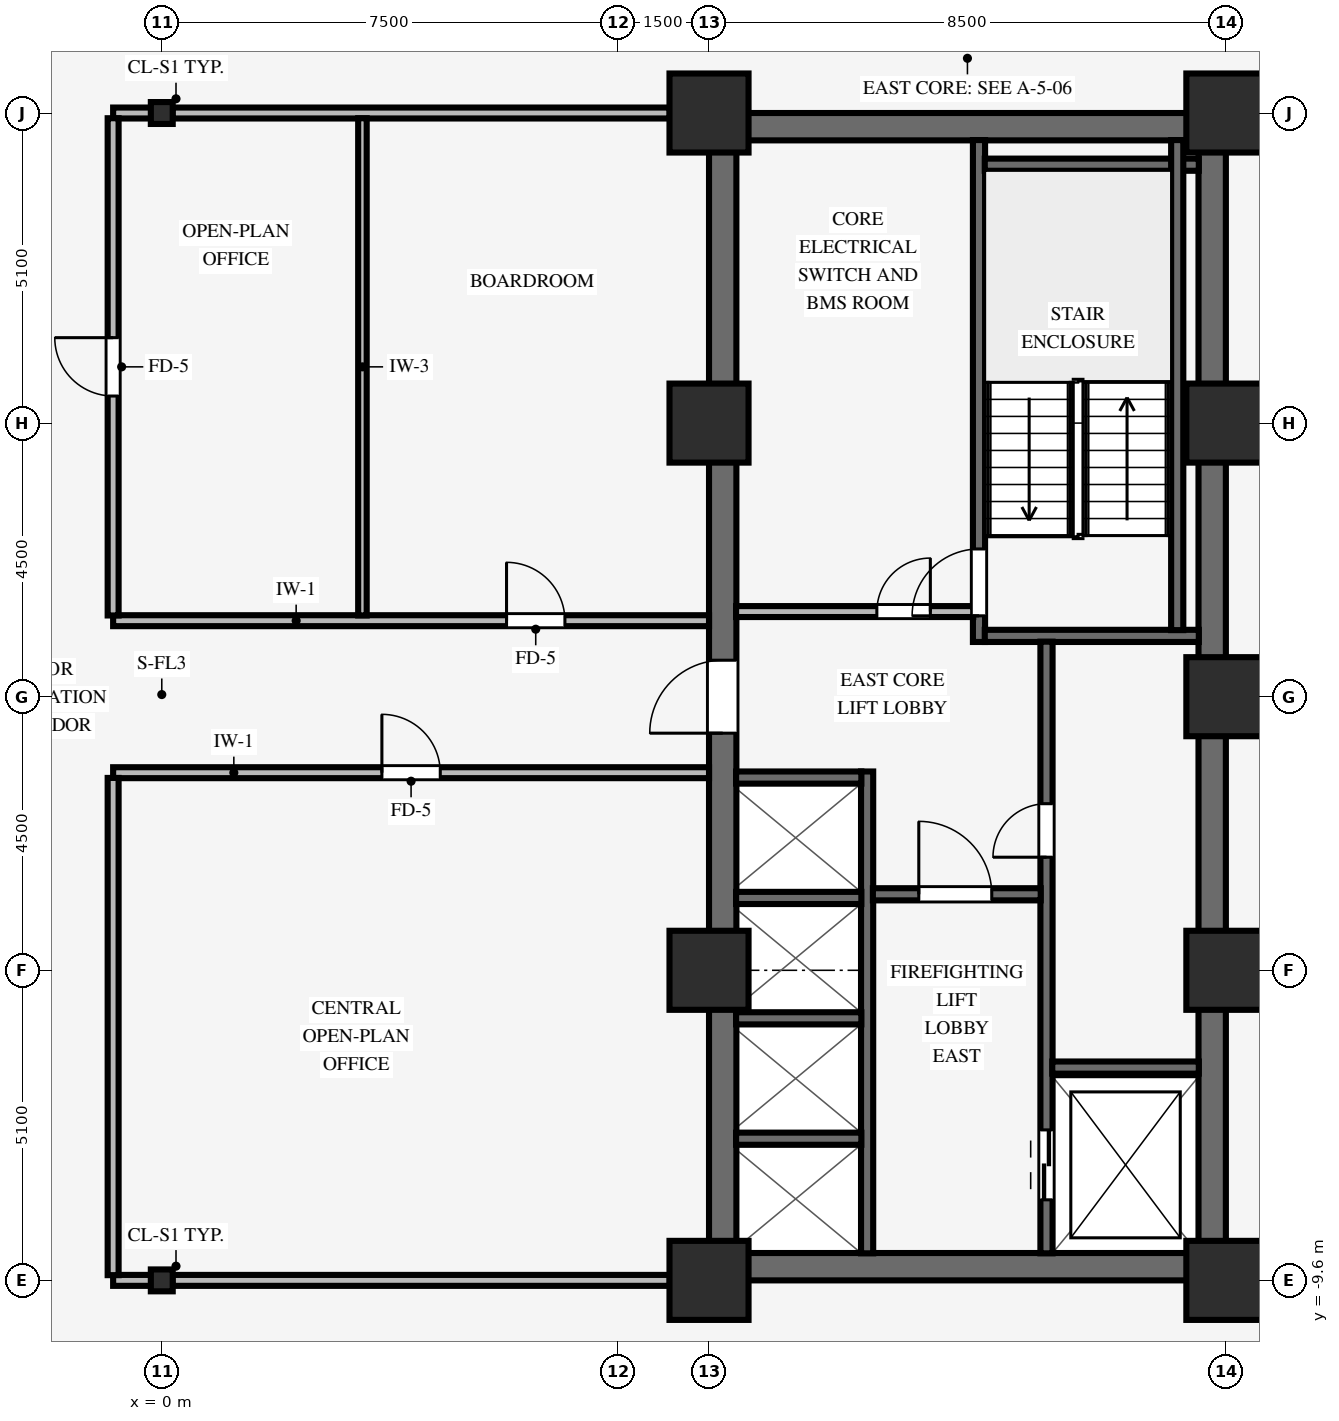
"""IFC4 building model, lengths in metres.
Left out: names, types, materials, properties, quantities, classifications, styles, units other than length and angle.
Written with IfcOpenShell. Run it as: python <this file> out.ifc"""

import sys

from ifc_helpers import new_model, si_unit, direction, frame, frame_2d, origin, origin_2d, place, context, subcontext, project, spatial, rectangle, i_section, extrude, source, transform, mapped, element, fill, save


model = new_model("IFC4")
c1 = context("Model", 3, precision=1e-05, world=origin(), true_north=direction((0.0, 1.0)))
c2 = subcontext(c1, "Body", "Model", "MODEL_VIEW")
j1 = project(units=[si_unit("LENGTHUNIT", "METRE"), si_unit("PLANEANGLEUNIT", "RADIAN")], contexts=[c1])
p1 = place(None, origin())
s1 = spatial("IfcSite", under=j1, at=p1, CompositionType="ELEMENT")
p2 = place(p1, origin())
s2 = spatial("IfcBuilding", under=s1, at=p2, CompositionType="ELEMENT")
p3 = place(p2, frame((0.0, 0.0, 27.6)))
s3 = spatial("IfcBuildingStorey", under=s2, at=p3, CompositionType="ELEMENT", Elevation=27.6)
for number, where, z_axis, x_axis in (
    (1, (9.0, -9.375, 0.0), (0.0, 0.0, 1.0), (1.0, 0.0, 0.0)),
    (2, (9.0, 9.375, 0.0), (0.0, 0.0, 1.0), (1.0, 0.0, 0.0)),
):
    element("IfcWall", number, at=place(p3, frame(where, z_axis=z_axis, x_axis=x_axis)), inside=s3, PredefinedType="SHEAR", context=c2, shape_type="SweptSolid", body=[
        extrude(rectangle(XDim=8.5, YDim=0.45, at=frame_2d((4.25, 0.0))), origin(), (0.0, 0.0, 1.0), 3.37),
    ])
p4 = place(p3, frame((9.225, -9.155, 0.0), z_axis=(0.0, 0.0, 1.0), x_axis=(0.0, 1.0, 0.0)))
e3 = element("IfcWall", 3, at=p4, inside=s3, PredefinedType="SHEAR", context=c2, shape_type="SweptSolid", body=[
    extrude(rectangle(XDim=18.31, YDim=0.45, at=frame_2d((9.155, 0.0))), origin(), (0.0, 0.0, 1.0), 3.37),
])
p5 = place(p4, frame((8.555, 0.0, 0.0)))
e4 = element("IfcOpeningElement", 4, at=p5, cuts=e3, PredefinedType="OPENING", context=c2, shape_type="SweptSolid", body=[
    extrude(rectangle(XDim=1.2, YDim=2.15, at=frame_2d((0.6, 1.075))), frame((0.0, 0.235, 0.0), z_axis=(0.0, -1.0, 0.0), x_axis=(1.0, 0.0, 0.0)), (0.0, 0.0, 1.0), 0.47),
])
p6 = place(p3, frame((17.275, -9.155, 0.0), z_axis=(0.0, 0.0, 1.0), x_axis=(0.0, 1.0, 0.0)))
e5 = element("IfcWall", 5, at=p6, inside=s3, PredefinedType="SHEAR", context=c2, shape_type="SweptSolid", body=[
    extrude(rectangle(XDim=18.31, YDim=0.45, at=frame_2d((9.155, 0.0))), origin(), (0.0, 0.0, 1.0), 3.37),
])
for number, where, z_axis, x_axis in (
    (6, (9.0, -9.6, 0.0), (0.0, 0.0, 1.0), (1.0, 0.0, 0.0)),
    (7, (9.0, -4.5, 0.0), (0.0, 0.0, 1.0), (1.0, 0.0, 0.0)),
    (8, (9.0, 4.5, 0.0), (0.0, 0.0, 1.0), (1.0, 0.0, 0.0)),
    (9, (9.0, 9.6, 0.0), (0.0, 0.0, 1.0), (1.0, 0.0, 0.0)),
    (10, (17.5, -9.6, 0.0), (0.0, 0.0, 1.0), (1.0, 0.0, 0.0)),
    (11, (17.5, -4.5, 0.0), (0.0, 0.0, 1.0), (1.0, 0.0, 0.0)),
    (12, (17.5, 4.5, 0.0), (0.0, 0.0, 1.0), (1.0, 0.0, 0.0)),
    (13, (17.5, 9.6, 0.0), (0.0, 0.0, 1.0), (1.0, 0.0, 0.0)),
    (14, (17.5, 0.0, 0.0), (0.0, 0.0, 1.0), (1.0, 0.0, 0.0)),
):
    element("IfcColumn", number, at=place(p3, frame(where, z_axis=z_axis, x_axis=x_axis)), inside=s3, PredefinedType="COLUMN", context=c2, shape_type="SweptSolid", body=[
        extrude(rectangle(XDim=1.3, YDim=1.3, at=origin_2d()), origin(), (0.0, 0.0, 1.0), 3.37),
    ])
for number, where, z_axis, x_axis in (
    (15, (0.0, -9.6, 0.0), (0.0, 0.0, 1.0), (1.0, 0.0, 0.0)),
    (16, (0.0, 9.6, 0.0), (0.0, 0.0, 1.0), (1.0, 0.0, 0.0)),
):
    element("IfcColumn", number, at=place(p3, frame(where, z_axis=z_axis, x_axis=x_axis)), inside=s3, PredefinedType="COLUMN", context=c2, shape_type="SweptSolid", body=[
        extrude(i_section(OverallWidth=0.36, OverallDepth=0.36, WebThickness=0.021, FlangeThickness=0.021, FilletRadius=0.018, at=origin_2d()), origin(), (0.0, 0.0, 1.0), 3.37),
    ])
p7 = place(p3, frame((13.44, 0.9, 0.0), z_axis=(0.0, 0.0, 1.0), x_axis=(0.0, 1.0, 0.0)))
e17 = element("IfcWall", 17, at=p7, inside=s3, PredefinedType="SHEAR", context=c2, shape_type="SweptSolid", body=[
    extrude(rectangle(XDim=8.255, YDim=0.2, at=frame_2d((4.127, 0.0))), origin(), (0.0, 0.0, 1.0), 3.37),
])
p8 = place(p7, frame((0.43, 0.0, 0.0)))
e18 = element("IfcOpeningElement", 18, at=p8, cuts=e17, PredefinedType="OPENING", context=c2, shape_type="SweptSolid", body=[
    extrude(rectangle(XDim=1.1, YDim=2.15, at=frame_2d((0.55, 1.075))), frame((0.0, 0.11, 0.0), z_axis=(0.0, -1.0, 0.0), x_axis=(1.0, 0.0, 0.0)), (0.0, 0.0, 1.0), 0.22),
])
for number, where, z_axis, x_axis in (
    (19, (13.535, 1.0, 0.0), (0.0, 0.0, 1.0), (1.0, 0.0, 0.0)),
    (20, (13.535, 8.75, 0.0), (0.0, 0.0, 1.0), (1.0, 0.0, 0.0)),
):
    element("IfcWall", number, at=place(p3, frame(where, z_axis=z_axis, x_axis=x_axis)), inside=s3, PredefinedType="SHEAR", context=c2, shape_type="SweptSolid", body=[
        extrude(rectangle(XDim=3.52, YDim=0.2, at=frame_2d((1.76, 0.0))), origin(), (0.0, 0.0, 1.0), 3.37),
    ])
p9 = place(p3, frame((16.7, 1.095, 0.0), z_axis=(0.0, 0.0, 1.0), x_axis=(0.0, 1.0, 0.0)))
e21 = element("IfcWall", 21, at=p9, inside=s3, PredefinedType="SHEAR", context=c2, shape_type="SweptSolid", body=[
    extrude(rectangle(XDim=8.06, YDim=0.2, at=frame_2d((4.03, 0.0))), origin(), (0.0, 0.0, 1.0), 3.37),
])
p10 = place(p3, frame((14.55, -9.155, 0.0), z_axis=(0.0, 0.0, 1.0), x_axis=(0.0, 1.0, 0.0)))
e22 = element("IfcWall", 22, at=p10, inside=s3, PredefinedType="SHEAR", context=c2, shape_type="SweptSolid", body=[
    extrude(rectangle(XDim=10.06, YDim=0.2, at=frame_2d((5.03, 0.0))), origin(), (0.0, 0.0, 1.0), 3.37),
])
p11 = place(p10, frame((6.515, 0.0, 0.0)))
e23 = element("IfcOpeningElement", 23, at=p11, cuts=e22, PredefinedType="OPENING", context=c2, shape_type="SweptSolid", body=[
    extrude(rectangle(XDim=0.88, YDim=2.1, at=frame_2d((0.44, 1.05))), frame((0.0, 0.11, 0.0), z_axis=(0.0, -1.0, 0.0), x_axis=(1.0, 0.0, 0.0)), (0.0, 0.0, 1.0), 0.22),
])
p12 = place(p10, frame((0.88, 0.0, 0.0)))
e24 = element("IfcOpeningElement", 24, at=p12, cuts=e22, PredefinedType="OPENING", context=c2, shape_type="SweptSolid", body=[
    extrude(rectangle(XDim=1.15, YDim=2.15, at=frame_2d((0.575, 1.075))), frame((0.0, 0.11, 0.0), z_axis=(0.0, -1.0, 0.0), x_axis=(1.0, 0.0, 0.0)), (0.0, 0.0, 1.0), 0.22),
])
p13 = place(p3, frame((14.645, -6.1, 0.0), z_axis=(0.0, 0.0, 1.0), x_axis=(1.0, 0.0, 0.0)))
e25 = element("IfcWall", 25, at=p13, inside=s3, PredefinedType="SHEAR", context=c2, shape_type="SweptSolid", body=[
    extrude(rectangle(XDim=2.41, YDim=0.2, at=frame_2d((1.205, 0.0))), origin(), (0.0, 0.0, 1.0), 3.37),
])
p14 = place(p3, frame((11.6, -9.155, 0.0), z_axis=(0.0, 0.0, 1.0), x_axis=(0.0, 1.0, 0.0)))
e26 = element("IfcWall", 26, at=p14, inside=s3, PredefinedType="SHEAR", context=c2, shape_type="SweptSolid", body=[
    extrude(rectangle(XDim=7.925, YDim=0.2, at=frame_2d((3.962, 0.0))), origin(), (0.0, 0.0, 1.0), 3.37),
])
p15 = place(p3, frame((11.695, -3.25, 0.0), z_axis=(0.0, 0.0, 1.0), x_axis=(1.0, 0.0, 0.0)))
e27 = element("IfcWall", 27, at=p15, inside=s3, PredefinedType="SHEAR", context=c2, shape_type="SweptSolid", body=[
    extrude(rectangle(XDim=2.76, YDim=0.2, at=frame_2d((1.38, 0.0))), origin(), (0.0, 0.0, 1.0), 3.37),
])
p16 = place(p15, frame((0.755, 0.0, 0.0)))
e28 = element("IfcOpeningElement", 28, at=p16, cuts=e27, PredefinedType="OPENING", context=c2, shape_type="SweptSolid", body=[
    extrude(rectangle(XDim=1.2, YDim=2.15, at=frame_2d((0.6, 1.075))), frame((0.0, 0.11, 0.0), z_axis=(0.0, -1.0, 0.0), x_axis=(1.0, 0.0, 0.0)), (0.0, 0.0, 1.0), 0.22),
])
for number, where, z_axis, x_axis in (
    (29, (9.445, -7.27, 0.0), (0.0, 0.0, 1.0), (1.0, 0.0, 0.0)),
    (30, (9.445, -5.29, 0.0), (0.0, 0.0, 1.0), (1.0, 0.0, 0.0)),
    (31, (9.445, -3.31, 0.0), (0.0, 0.0, 1.0), (1.0, 0.0, 0.0)),
    (32, (9.445, -1.33, 0.0), (0.0, 0.0, 1.0), (1.0, 0.0, 0.0)),
):
    element("IfcWall", number, at=place(p3, frame(where, z_axis=z_axis, x_axis=x_axis)), inside=s3, PredefinedType="SHEAR", context=c2, shape_type="SweptSolid", body=[
        extrude(rectangle(XDim=2.06, YDim=0.2, at=frame_2d((1.03, 0.0))), origin(), (0.0, 0.0, 1.0), 3.37),
    ])
p17 = place(p3, frame((9.445, 1.4, 0.0), z_axis=(0.0, 0.0, 1.0), x_axis=(1.0, 0.0, 0.0)))
e33 = element("IfcWall", 33, at=p17, inside=s3, PredefinedType="PARTITIONING", context=c2, shape_type="SweptSolid", body=[
    extrude(rectangle(XDim=3.9, YDim=0.18, at=frame_2d((1.95, 0.0))), origin(), (0.0, 0.0, 1.0), 3.36),
])
p18 = place(p17, frame((2.315, 0.0, 0.0)))
e34 = element("IfcOpeningElement", 34, at=p18, cuts=e33, PredefinedType="OPENING", context=c2, shape_type="SweptSolid", body=[
    extrude(rectangle(XDim=0.88, YDim=2.1, at=frame_2d((0.44, 1.05))), frame((0.0, 0.1, 0.0), z_axis=(0.0, -1.0, 0.0), x_axis=(1.0, 0.0, 0.0)), (0.0, 0.0, 1.0), 0.2),
])
p19 = place(p3, frame((-0.8, -9.6, 0.0), z_axis=(0.0, 0.0, 1.0), x_axis=(1.0, 0.0, 0.0)))
e35 = element("IfcWall", 35, at=p19, inside=s3, PredefinedType="PARTITIONING", context=c2, shape_type="SweptSolid", body=[
    extrude(rectangle(XDim=0.624, YDim=0.18, at=frame_2d((0.312, 0.0))), origin(), (0.0, 0.0, 1.0), 2.405),
])
p20 = place(p3, frame((0.176, -9.6, 0.0), z_axis=(0.0, 0.0, 1.0), x_axis=(1.0, 0.0, 0.0)))
e36 = element("IfcWall", 36, at=p20, inside=s3, PredefinedType="PARTITIONING", context=c2, shape_type="SweptSolid", body=[
    extrude(rectangle(XDim=8.178, YDim=0.18, at=frame_2d((4.089, 0.0))), origin(), (0.0, 0.0, 1.0), 2.405),
])
p21 = place(p3, frame((-0.8, -1.25, 0.0), z_axis=(0.0, 0.0, 1.0), x_axis=(1.0, 0.0, 0.0)))
e37 = element("IfcWall", 37, at=p21, inside=s3, PredefinedType="PARTITIONING", context=c2, shape_type="SweptSolid", body=[
    extrude(rectangle(XDim=9.8, YDim=0.18, at=frame_2d((4.9, 0.0))), origin(), (0.0, 0.0, 1.0), 3.36),
])
p22 = place(p21, frame((4.42, 0.0, 0.0)))
e38 = element("IfcOpeningElement", 38, at=p22, cuts=e37, PredefinedType="OPENING", context=c2, shape_type="SweptSolid", body=[
    extrude(rectangle(XDim=0.96, YDim=2.1, at=frame_2d((0.48, 1.05))), frame((0.0, 0.1, 0.0), z_axis=(0.0, -1.0, 0.0), x_axis=(1.0, 0.0, 0.0)), (0.0, 0.0, 1.0), 0.2),
])
p23 = place(p3, frame((-0.8, 1.25, 0.0), z_axis=(0.0, 0.0, 1.0), x_axis=(1.0, 0.0, 0.0)))
e39 = element("IfcWall", 39, at=p23, inside=s3, PredefinedType="PARTITIONING", context=c2, shape_type="SweptSolid", body=[
    extrude(rectangle(XDim=9.8, YDim=0.18, at=frame_2d((4.9, 0.0))), origin(), (0.0, 0.0, 1.0), 3.36),
])
p24 = place(p23, frame((6.47, 0.0, 0.0)))
e40 = element("IfcOpeningElement", 40, at=p24, cuts=e39, PredefinedType="OPENING", context=c2, shape_type="SweptSolid", body=[
    extrude(rectangle(XDim=0.96, YDim=2.1, at=frame_2d((0.48, 1.05))), frame((0.0, 0.1, 0.0), z_axis=(0.0, -1.0, 0.0), x_axis=(1.0, 0.0, 0.0)), (0.0, 0.0, 1.0), 0.2),
])
p25 = place(p3, frame((-0.8, 9.6, 0.0), z_axis=(0.0, 0.0, 1.0), x_axis=(1.0, 0.0, 0.0)))
e41 = element("IfcWall", 41, at=p25, inside=s3, PredefinedType="PARTITIONING", context=c2, shape_type="SweptSolid", body=[
    extrude(rectangle(XDim=0.624, YDim=0.18, at=frame_2d((0.312, 0.0))), origin(), (0.0, 0.0, 1.0), 2.405),
])
p26 = place(p3, frame((0.176, 9.6, 0.0), z_axis=(0.0, 0.0, 1.0), x_axis=(1.0, 0.0, 0.0)))
e42 = element("IfcWall", 42, at=p26, inside=s3, PredefinedType="PARTITIONING", context=c2, shape_type="SweptSolid", body=[
    extrude(rectangle(XDim=8.178, YDim=0.18, at=frame_2d((4.089, 0.0))), origin(), (0.0, 0.0, 1.0), 2.405),
])
p27 = place(p3, frame((-0.8, -9.514, 0.0), z_axis=(0.0, 0.0, 1.0), x_axis=(0.0, 1.0, 0.0)))
e43 = element("IfcWall", 43, at=p27, inside=s3, PredefinedType="PARTITIONING", context=c2, shape_type="SweptSolid", body=[
    extrude(rectangle(XDim=8.178, YDim=0.18, at=frame_2d((4.089, 0.0))), origin(), (0.0, 0.0, 1.0), 3.36),
])
p28 = place(p3, frame((-0.8, 1.336, 0.0), z_axis=(0.0, 0.0, 1.0), x_axis=(0.0, 1.0, 0.0)))
e44 = element("IfcWall", 44, at=p28, inside=s3, PredefinedType="PARTITIONING", context=c2, shape_type="SweptSolid", body=[
    extrude(rectangle(XDim=8.178, YDim=0.18, at=frame_2d((4.089, 0.0))), origin(), (0.0, 0.0, 1.0), 3.36),
])
p29 = place(p28, frame((3.609, 0.0, 0.0)))
e45 = element("IfcOpeningElement", 45, at=p29, cuts=e44, PredefinedType="OPENING", context=c2, shape_type="SweptSolid", body=[
    extrude(rectangle(XDim=0.96, YDim=2.1, at=frame_2d((0.48, 1.05))), frame((0.0, 0.1, 0.0), z_axis=(0.0, -1.0, 0.0), x_axis=(1.0, 0.0, 0.0)), (0.0, 0.0, 1.0), 0.2),
])
p30 = place(p3, frame((3.3, 1.336, 0.0), z_axis=(0.0, 0.0, 1.0), x_axis=(0.0, 1.0, 0.0)))
e46 = element("IfcWall", 46, at=p30, inside=s3, PredefinedType="PARTITIONING", context=c2, shape_type="SweptSolid", body=[
    extrude(rectangle(XDim=8.178, YDim=0.14, at=frame_2d((4.089, 0.0))), origin(), (0.0, 0.0, 1.0), 3.36),
])
m1 = source(origin(), c2, "Body", "SweptSolid", [
    extrude(rectangle(XDim=1.1, YDim=2.15, at=frame_2d((0.55, 1.075))), frame((0.0, 0.025, 0.0), z_axis=(0.0, -1.0, 0.0), x_axis=(1.0, 0.0, 0.0)), (0.0, 0.0, 1.0), 0.05),
])
p31 = place(p8, origin())
e47 = element("IfcDoor", 47, at=p31, inside=s3, OperationType="SINGLE_SWING_LEFT", PredefinedType="DOOR", context=c2, shape_type="MappedRepresentation", body=[
    mapped(m1, transform((0.0, 0.0, 0.0), scale=1.0)),
])
fill(e18, e47)
m2 = source(origin(), c2, "Body", "SweptSolid", [
    extrude(rectangle(XDim=0.88, YDim=2.1, at=frame_2d((0.44, 1.05))), frame((0.0, 0.025, 0.0), z_axis=(0.0, -1.0, 0.0), x_axis=(1.0, 0.0, 0.0)), (0.0, 0.0, 1.0), 0.05),
])
p32 = place(p11, origin())
e48 = element("IfcDoor", 48, at=p32, inside=s3, OperationType="SINGLE_SWING_LEFT", PredefinedType="DOOR", context=c2, shape_type="MappedRepresentation", body=[
    mapped(m2, transform((0.0, 0.0, 0.0), scale=1.0)),
])
fill(e23, e48)
m3 = source(origin(), c2, "Body", "SweptSolid", [
    extrude(rectangle(XDim=1.2, YDim=2.15, at=frame_2d((0.6, 1.075))), frame((0.0, 0.025, 0.0), z_axis=(0.0, -1.0, 0.0), x_axis=(1.0, 0.0, 0.0)), (0.0, 0.0, 1.0), 0.05),
])
p33 = place(p16, origin())
e49 = element("IfcDoor", 49, at=p33, inside=s3, OperationType="SINGLE_SWING_LEFT", PredefinedType="DOOR", context=c2, shape_type="MappedRepresentation", body=[
    mapped(m3, transform((0.0, 0.0, 0.0), scale=1.0)),
])
fill(e28, e49)
p34 = place(p5, origin())
e50 = element("IfcDoor", 50, at=p34, inside=s3, OperationType="SINGLE_SWING_LEFT", PredefinedType="DOOR", context=c2, shape_type="MappedRepresentation", body=[
    mapped(m3, transform((0.0, 0.0, 0.0), scale=1.0)),
])
fill(e4, e50)
p35 = place(p18, origin())
e51 = element("IfcDoor", 51, at=p35, inside=s3, OperationType="SINGLE_SWING_RIGHT", PredefinedType="DOOR", context=c2, shape_type="MappedRepresentation", body=[
    mapped(m2, transform((0.0, 0.0, 0.0), scale=1.0)),
])
fill(e34, e51)
m4 = source(origin(), c2, "Body", "SweptSolid", [
    extrude(rectangle(XDim=1.15, YDim=2.15, at=frame_2d((0.575, 1.075))), frame((0.0, 0.025, 0.0), z_axis=(0.0, -1.0, 0.0), x_axis=(1.0, 0.0, 0.0)), (0.0, 0.0, 1.0), 0.05),
])
p36 = place(p12, origin())
e52 = element("IfcDoor", 52, at=p36, inside=s3, OperationType="DOUBLE_DOOR_SLIDING", PredefinedType="DOOR", context=c2, shape_type="MappedRepresentation", body=[
    mapped(m4, transform((0.0, 0.0, 0.0), scale=1.0)),
])
fill(e24, e52)
m5 = source(origin(), c2, "Body", "SweptSolid", [
    extrude(rectangle(XDim=0.96, YDim=2.1, at=frame_2d((0.48, 1.05))), frame((0.0, 0.025, 0.0), z_axis=(0.0, -1.0, 0.0), x_axis=(1.0, 0.0, 0.0)), (0.0, 0.0, 1.0), 0.05),
])
p37 = place(p22, origin())
e53 = element("IfcDoor", 53, at=p37, inside=s3, OperationType="SINGLE_SWING_LEFT", PredefinedType="DOOR", context=c2, shape_type="MappedRepresentation", body=[
    mapped(m5, transform((0.0, 0.0, 0.0), scale=1.0)),
])
fill(e38, e53)
p38 = place(p29, origin())
e54 = element("IfcDoor", 54, at=p38, inside=s3, OperationType="SINGLE_SWING_RIGHT", PredefinedType="DOOR", context=c2, shape_type="MappedRepresentation", body=[
    mapped(m5, transform((0.0, 0.0, 0.0), scale=1.0)),
])
fill(e45, e54)
p39 = place(p24, origin())
e55 = element("IfcDoor", 55, at=p39, inside=s3, OperationType="SINGLE_SWING_LEFT", PredefinedType="DOOR", context=c2, shape_type="MappedRepresentation", body=[
    mapped(m5, transform((0.0, 0.0, 0.0), scale=1.0)),
])
fill(e40, e55)
save(model, sys.argv[1])
